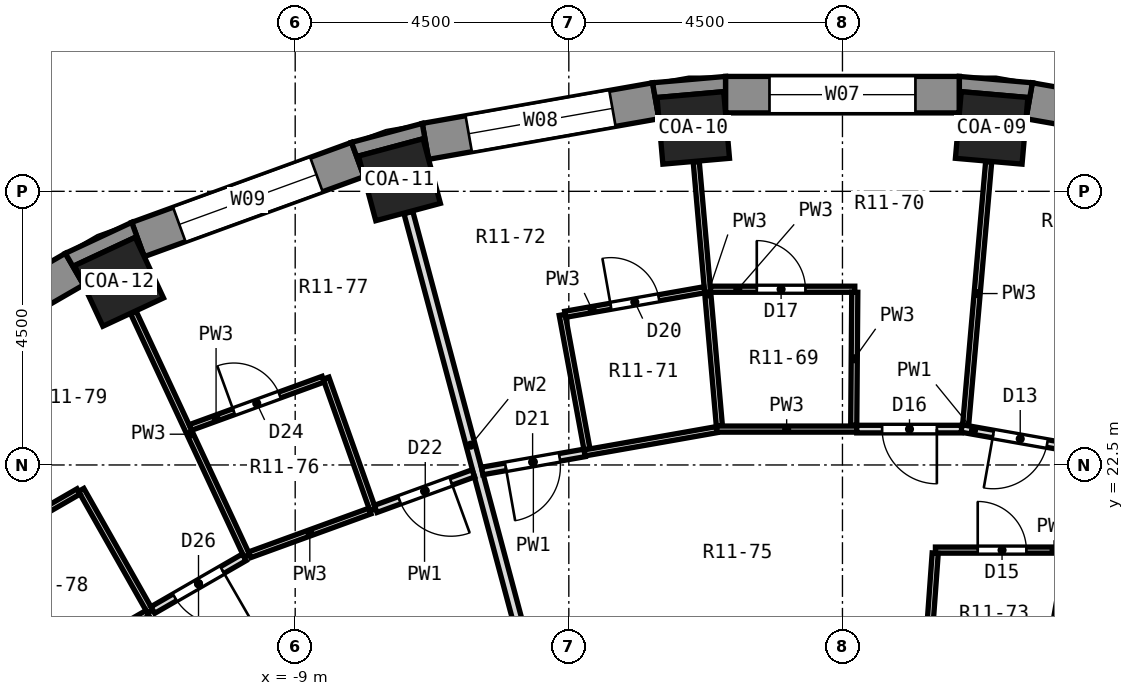
"""IFC4 building model, lengths in metres.
Left out: names, types, materials, properties, quantities, classifications, styles, units other than length and angle.
Written with IfcOpenShell. Run it as: python <this file> out.ifc"""

import sys

from ifc_helpers import new_model, si_unit, direction, frame, frame_2d, origin, origin_2d, place, context, subcontext, project, spatial, polyline, rectangle, outline, extrude, element, fill, save


model = new_model("IFC4")
c1 = context("Model", 3, precision=1e-05, world=origin(), true_north=direction((0.0, 1.0)))
c2 = subcontext(c1, "Body", "Model", "MODEL_VIEW")
j1 = project(units=[si_unit("LENGTHUNIT", "METRE"), si_unit("PLANEANGLEUNIT", "RADIAN")], contexts=[c1])
p1 = place(None, origin())
s1 = spatial("IfcSite", under=j1, at=p1, CompositionType="ELEMENT")
p2 = place(p1, origin())
s2 = spatial("IfcBuilding", under=s1, at=p2, CompositionType="ELEMENT")
p3 = place(p2, frame((0.0, 0.0, 46.1)))
s3 = spatial("IfcBuildingStorey", under=s2, at=p3, CompositionType="ELEMENT", Elevation=46.1)
for number, where, z_axis, x_axis in (
    (1, (2.453, 28.043, 0.0), (0.0, 0.0, 1.0), (0.087, 0.996, 0.0)),
    (2, (-2.453, 28.043, 0.0), (0.0, 0.0, 1.0), (-0.087, 0.996, 0.0)),
    (3, (-7.286, 27.191, 0.0), (0.0, 0.0, 1.0), (-0.259, 0.966, 0.0)),
    (4, (-11.897, 25.512, 0.0), (0.0, 0.0, 1.0), (-0.423, 0.906, 0.0)),
):
    element("IfcColumn", number, at=place(p3, frame(where, z_axis=z_axis, x_axis=x_axis)), inside=s3, PredefinedType="COLUMN", context=c2, shape_type="SweptSolid", body=[
        extrude(rectangle(XDim=1.1, YDim=1.1, at=origin_2d()), origin(), (0.0, 0.0, 1.0), 3.3),
    ])
p4 = place(p3, frame((6.858, 27.821, 0.0), z_axis=(0.0, 0.0, 1.0), x_axis=(-0.984800809218, 0.173687553279, 0.0)))
e5 = element("IfcWall", 5, at=p4, inside=s3, PredefinedType="SOLIDWALL", context=c2, shape_type="SweptSolid", body=[
    extrude(rectangle(XDim=3.846, YDim=0.6, at=frame_2d((1.923, 0.0))), origin(), (0.0, 0.0, 1.0), 2.75),
])
p5 = place(p4, frame((0.723, 0.0, 0.9)))
e6 = element("IfcOpeningElement", 6, at=p5, cuts=e5, PredefinedType="OPENING", context=c2, shape_type="SweptSolid", body=[
    extrude(rectangle(XDim=2.4, YDim=1.8, at=frame_2d((1.2, 0.9))), frame((0.0, 0.312, 0.0), z_axis=(0.0, -1.0, 0.0), x_axis=(1.0, 0.0, 0.0)), (0.0, 0.0, 1.0), 0.624),
])
p6 = place(p3, frame((1.923, 28.59, 0.0), z_axis=(0.0, 0.0, 1.0), x_axis=(-1.0, 0.0, 0.0)))
e7 = element("IfcWall", 7, at=p6, inside=s3, PredefinedType="SOLIDWALL", context=c2, shape_type="SweptSolid", body=[
    extrude(rectangle(XDim=3.846, YDim=0.6, at=frame_2d((1.923, 0.0))), origin(), (0.0, 0.0, 1.0), 2.75),
])
p7 = place(p6, frame((0.723, 0.0, 0.9)))
e8 = element("IfcOpeningElement", 8, at=p7, cuts=e7, PredefinedType="OPENING", context=c2, shape_type="SweptSolid", body=[
    extrude(rectangle(XDim=2.4, YDim=1.8, at=frame_2d((1.2, 0.9))), frame((0.0, 0.312, 0.0), z_axis=(0.0, -1.0, 0.0), x_axis=(1.0, 0.0, 0.0)), (0.0, 0.0, 1.0), 0.624),
])
p8 = place(p3, frame((-3.071, 28.489, 0.0), z_axis=(0.0, 0.0, 1.0), x_axis=(-0.984800809218, -0.173687553279, 0.0)))
e9 = element("IfcWall", 9, at=p8, inside=s3, PredefinedType="SOLIDWALL", context=c2, shape_type="SweptSolid", body=[
    extrude(rectangle(XDim=3.846, YDim=0.6, at=frame_2d((1.923, 0.0))), origin(), (0.0, 0.0, 1.0), 2.75),
])
p9 = place(p8, frame((0.723, 0.0, 0.9)))
e10 = element("IfcOpeningElement", 10, at=p9, cuts=e9, PredefinedType="OPENING", context=c2, shape_type="SweptSolid", body=[
    extrude(rectangle(XDim=2.4, YDim=1.8, at=frame_2d((1.2, 0.9))), frame((0.0, 0.312, 0.0), z_axis=(0.0, -1.0, 0.0), x_axis=(1.0, 0.0, 0.0)), (0.0, 0.0, 1.0), 0.624),
])
p10 = place(p3, frame((-7.971, 27.523, 0.0), z_axis=(0.0, 0.0, 1.0), x_axis=(-0.939689588564, -0.342028474173, 0.0)))
e11 = element("IfcWall", 11, at=p10, inside=s3, PredefinedType="SOLIDWALL", context=c2, shape_type="SweptSolid", body=[
    extrude(rectangle(XDim=3.846, YDim=0.6, at=frame_2d((1.923, 0.0))), origin(), (0.0, 0.0, 1.0), 2.75),
])
p11 = place(p10, frame((0.723, 0.0, 0.9)))
e12 = element("IfcOpeningElement", 12, at=p11, cuts=e11, PredefinedType="OPENING", context=c2, shape_type="SweptSolid", body=[
    extrude(rectangle(XDim=2.4, YDim=1.8, at=frame_2d((1.2, 0.9))), frame((0.0, 0.312, 0.0), z_axis=(0.0, -1.0, 0.0), x_axis=(1.0, 0.0, 0.0)), (0.0, 0.0, 1.0), 0.624),
])
p12 = place(p3, frame((-12.63, 25.721, 0.0), z_axis=(0.0, 0.0, 1.0), x_axis=(-0.86603124159, -0.499989888488, 0.0)))
e13 = element("IfcWall", 13, at=p12, inside=s3, PredefinedType="SOLIDWALL", context=c2, shape_type="SweptSolid", body=[
    extrude(rectangle(XDim=3.846, YDim=0.6, at=frame_2d((1.923, 0.0))), origin(), (0.0, 0.0, 1.0), 2.75),
])
p13 = place(p12, frame((0.723, 0.0, 0.9)))
e14 = element("IfcOpeningElement", 14, at=p13, cuts=e13, PredefinedType="OPENING", context=c2, shape_type="SweptSolid", body=[
    extrude(rectangle(XDim=2.4, YDim=1.8, at=frame_2d((1.2, 0.9))), frame((0.0, 0.312, 0.0), z_axis=(0.0, -1.0, 0.0), x_axis=(1.0, 0.0, 0.0)), (0.0, 0.0, 1.0), 0.624),
])
p14 = place(p3, origin())
e15 = element("IfcWall", 15, at=p14, inside=s3, PredefinedType="SOLIDWALL", context=c2, shape_type="SweptSolid", body=[
    extrude(outline(polyline([(3.123, 28.785), (1.923, 28.89), (1.923, 28.29), (1.954, 28.639), (3.049, 28.543), (3.019, 28.194), (3.123, 28.785)])), origin(), (0.0, 0.0, 1.0), 2.75),
])
p15 = place(p3, origin())
e16 = element("IfcWall", 16, at=p15, inside=s3, PredefinedType="SOLIDWALL", context=c2, shape_type="SweptSolid", body=[
    extrude(outline(polyline([(-1.923, 28.89), (-3.123, 28.785), (-3.019, 28.194), (-3.049, 28.543), (-1.954, 28.639), (-1.923, 28.29), (-1.923, 28.89)])), origin(), (0.0, 0.0, 1.0), 2.75),
])
p16 = place(p3, origin())
e17 = element("IfcWall", 17, at=p16, inside=s3, PredefinedType="SOLIDWALL", context=c2, shape_type="SweptSolid", body=[
    extrude(outline(polyline([(-6.91, 28.117), (-8.074, 27.805), (-7.869, 27.241), (-7.959, 27.58), (-6.897, 27.865), (-6.806, 27.526), (-6.91, 28.117)])), origin(), (0.0, 0.0, 1.0), 2.75),
])
p17 = place(p3, origin())
e18 = element("IfcWall", 18, at=p17, inside=s3, PredefinedType="SOLIDWALL", context=c2, shape_type="SweptSolid", body=[
    extrude(outline(polyline([(-12.78, 25.981), (-12.479, 25.461), (-12.628, 25.779), (-11.631, 26.243), (-11.483, 25.926), (-11.688, 26.49), (-12.78, 25.981)])), origin(), (0.0, 0.0, 1.0), 2.75),
])
p18 = place(p3, frame((-2.405, 27.485, 0.0), z_axis=(0.0, 0.0, 1.0), x_axis=(0.087315535453, -0.996180705128, 0.0)))
e19 = element("IfcWall", 19, at=p18, inside=s3, PredefinedType="PARTITIONING", context=c2, shape_type="SweptSolid", body=[
    extrude(rectangle(XDim=4.362, YDim=0.1, at=frame_2d((2.181, 0.0))), origin(), (0.0, 0.0, 1.0), 2.75),
])
p19 = place(p3, frame((-4.609, 24.969, 0.0), z_axis=(0.0, 0.0, 1.0), x_axis=(0.181195568125, -0.983447083524, 0.0)))
e20 = element("IfcWall", 20, at=p19, inside=s3, PredefinedType="PARTITIONING", context=c2, shape_type="SweptSolid", body=[
    extrude(rectangle(XDim=2.25, YDim=0.1, at=frame_2d((1.125, 0.0))), origin(), (0.0, 0.0, 1.0), 2.75),
])
p20 = place(p3, frame((-7.138, 26.651, 0.0), z_axis=(0.0, 0.0, 1.0), x_axis=(0.258510598433, -0.966008421546, 0.0)))
e21 = element("IfcWall", 21, at=p20, inside=s3, PredefinedType="PARTITIONING", context=c2, shape_type="SweptSolid", body=[
    extrude(rectangle(XDim=7.92, YDim=0.15, at=frame_2d((3.96, 0.0))), origin(), (0.0, 0.0, 1.0), 2.75),
])
p21 = place(p3, frame((-8.493, 23.928, 0.0), z_axis=(0.0, 0.0, 1.0), x_axis=(0.334695622164, -0.942326291952, 0.0)))
e22 = element("IfcWall", 22, at=p21, inside=s3, PredefinedType="PARTITIONING", context=c2, shape_type="SweptSolid", body=[
    extrude(rectangle(XDim=2.301, YDim=0.1, at=frame_2d((1.15, 0.0))), origin(), (0.0, 0.0, 1.0), 2.75),
])
p22 = place(p3, frame((-11.66, 25.005, 0.0), z_axis=(0.0, 0.0, 1.0), x_axis=(0.422658280027, -0.906289125127, 0.0)))
e23 = element("IfcWall", 23, at=p22, inside=s3, PredefinedType="PARTITIONING", context=c2, shape_type="SweptSolid", body=[
    extrude(rectangle(XDim=4.413, YDim=0.1, at=frame_2d((2.206, 0.0))), origin(), (0.0, 0.0, 1.0), 2.75),
])
p23 = place(p3, frame((-12.519, 22.09, 0.0), z_axis=(0.0, 0.0, 1.0), x_axis=(0.49306078006, -0.869994866173, 0.0)))
e24 = element("IfcWall", 24, at=p23, inside=s3, PredefinedType="PARTITIONING", context=c2, shape_type="SweptSolid", body=[
    extrude(rectangle(XDim=2.3, YDim=0.1, at=frame_2d((1.15, 0.0))), origin(), (0.0, 0.0, 1.0), 2.75),
])
p24 = place(p3, frame((1.958, 23.101, 0.0), z_axis=(0.0, 0.0, 1.0), x_axis=(0.984778239754, -0.173815472575, 0.0)))
e25 = element("IfcWall", 25, at=p24, inside=s3, PredefinedType="PARTITIONING", context=c2, shape_type="SweptSolid", body=[
    extrude(rectangle(XDim=1.848, YDim=0.125, at=frame_2d((0.924, 0.0))), origin(), (0.0, 0.0, 1.0), 2.75),
])
p25 = place(p24, frame((0.531, 0.0, 0.0)))
e26 = element("IfcOpeningElement", 26, at=p25, cuts=e25, PredefinedType="OPENING", context=c2, shape_type="SweptSolid", body=[
    extrude(rectangle(XDim=0.9, YDim=2.1, at=frame_2d((0.45, 1.05))), frame((0.0, 0.074, 0.0), z_axis=(0.0, -1.0, 0.0), x_axis=(1.0, 0.0, 0.0)), (0.0, 0.0, 1.0), 0.149),
])
p26 = place(p3, frame((1.529, 21.1, 0.0), z_axis=(0.0, 0.0, 1.0), x_axis=(1.0, 0.0, 0.0)))
e27 = element("IfcWall", 27, at=p26, inside=s3, PredefinedType="PARTITIONING", context=c2, shape_type="SweptSolid", body=[
    extrude(rectangle(XDim=2.191, YDim=0.1, at=frame_2d((1.095, 0.0))), origin(), (0.0, 0.0, 1.0), 2.75),
])
p27 = place(p26, frame((0.696, 0.0, 0.0)))
e28 = element("IfcOpeningElement", 28, at=p27, cuts=e27, PredefinedType="OPENING", context=c2, shape_type="SweptSolid", body=[
    extrude(rectangle(XDim=0.8, YDim=2.1, at=frame_2d((0.4, 1.05))), frame((0.0, 0.062, 0.0), z_axis=(0.0, -1.0, 0.0), x_axis=(1.0, 0.0, 0.0)), (0.0, 0.0, 1.0), 0.124),
])
p28 = place(p3, frame((-2.071, 23.09, 0.0), z_axis=(0.0, 0.0, 1.0), x_axis=(1.0, 0.0, 0.0)))
e29 = element("IfcWall", 29, at=p28, inside=s3, PredefinedType="PARTITIONING", context=c2, shape_type="SweptSolid", body=[
    extrude(rectangle(XDim=2.306, YDim=0.1, at=frame_2d((1.153, 0.0))), origin(), (0.0, 0.0, 1.0), 2.75),
])
p29 = place(p3, frame((0.235, 23.09, 0.0), z_axis=(0.0, 0.0, 1.0), x_axis=(1.0, 0.0, 0.0)))
e30 = element("IfcWall", 30, at=p29, inside=s3, PredefinedType="PARTITIONING", context=c2, shape_type="SweptSolid", body=[
    extrude(rectangle(XDim=1.722, YDim=0.125, at=frame_2d((0.861, 0.0))), origin(), (0.0, 0.0, 1.0), 2.75),
])
p30 = place(p29, frame((0.417, 0.0, 0.0)))
e31 = element("IfcOpeningElement", 31, at=p30, cuts=e30, PredefinedType="OPENING", context=c2, shape_type="SweptSolid", body=[
    extrude(rectangle(XDim=0.9, YDim=2.1, at=frame_2d((0.45, 1.05))), frame((0.0, 0.074, 0.0), z_axis=(0.0, -1.0, 0.0), x_axis=(1.0, 0.0, 0.0)), (0.0, 0.0, 1.0), 0.149),
])
p31 = place(p3, frame((-2.171, 25.39, 0.0), z_axis=(0.0, 0.0, 1.0), x_axis=(1.0, 0.0, 0.0)))
e32 = element("IfcWall", 32, at=p31, inside=s3, PredefinedType="PARTITIONING", context=c2, shape_type="SweptSolid", body=[
    extrude(rectangle(XDim=2.374, YDim=0.1, at=frame_2d((1.187, 0.0))), origin(), (0.0, 0.0, 1.0), 2.75),
])
p32 = place(p31, frame((0.762, 0.0, 0.0)))
e33 = element("IfcOpeningElement", 33, at=p32, cuts=e32, PredefinedType="OPENING", context=c2, shape_type="SweptSolid", body=[
    extrude(rectangle(XDim=0.8, YDim=2.1, at=frame_2d((0.4, 1.05))), frame((0.0, 0.062, 0.0), z_axis=(0.0, -1.0, 0.0), x_axis=(1.0, 0.0, 0.0)), (0.0, 0.0, 1.0), 0.124),
])
p33 = place(p3, frame((-4.241, 22.698, 0.0), z_axis=(0.0, 0.0, 1.0), x_axis=(0.984822536066, 0.173564317922, 0.0)))
e34 = element("IfcWall", 34, at=p33, inside=s3, PredefinedType="PARTITIONING", context=c2, shape_type="SweptSolid", body=[
    extrude(rectangle(XDim=2.206, YDim=0.1, at=frame_2d((1.103, 0.0))), origin(), (0.0, 0.0, 1.0), 2.75),
])
p34 = place(p3, frame((-5.925, 22.401, 0.0), z_axis=(0.0, 0.0, 1.0), x_axis=(0.984786433544, 0.173769043008, 0.0)))
e35 = element("IfcWall", 35, at=p34, inside=s3, PredefinedType="PARTITIONING", context=c2, shape_type="SweptSolid", body=[
    extrude(rectangle(XDim=1.71, YDim=0.125, at=frame_2d((0.855, 0.0))), origin(), (0.0, 0.0, 1.0), 2.75),
])
p35 = place(p34, frame((0.393, 0.0, 0.0)))
e36 = element("IfcOpeningElement", 36, at=p35, cuts=e35, PredefinedType="OPENING", context=c2, shape_type="SweptSolid", body=[
    extrude(rectangle(XDim=0.9, YDim=2.1, at=frame_2d((0.45, 1.05))), frame((0.0, 0.074, 0.0), z_axis=(0.0, -1.0, 0.0), x_axis=(1.0, 0.0, 0.0)), (0.0, 0.0, 1.0), 0.149),
])
p36 = place(p3, frame((-4.56, 24.978, 0.0), z_axis=(0.0, 0.0, 1.0), x_axis=(0.984818426074, 0.173587636842, 0.0)))
e37 = element("IfcWall", 37, at=p36, inside=s3, PredefinedType="PARTITIONING", context=c2, shape_type="SweptSolid", body=[
    extrude(rectangle(XDim=2.325, YDim=0.1, at=frame_2d((1.163, 0.0))), origin(), (0.0, 0.0, 1.0), 2.75),
])
p37 = place(p36, frame((0.762, 0.0, 0.0)))
e38 = element("IfcOpeningElement", 38, at=p37, cuts=e37, PredefinedType="OPENING", context=c2, shape_type="SweptSolid", body=[
    extrude(rectangle(XDim=0.8, YDim=2.1, at=frame_2d((0.4, 1.05))), frame((0.0, 0.062, 0.0), z_axis=(0.0, -1.0, 0.0), x_axis=(1.0, 0.0, 0.0)), (0.0, 0.0, 1.0), 0.124),
])
p38 = place(p3, frame((-9.748, 21.023, 0.0), z_axis=(0.0, 0.0, 1.0), x_axis=(0.939725675468, 0.341929312674, 0.0)))
e39 = element("IfcWall", 39, at=p38, inside=s3, PredefinedType="PARTITIONING", context=c2, shape_type="SweptSolid", body=[
    extrude(rectangle(XDim=2.105, YDim=0.1, at=frame_2d((1.052, 0.0))), origin(), (0.0, 0.0, 1.0), 2.75),
])
p39 = place(p3, frame((-7.676, 21.777, 0.0), z_axis=(0.0, 0.0, 1.0), x_axis=(0.939597315436, 0.342281879195, 0.0)))
e40 = element("IfcWall", 40, at=p39, inside=s3, PredefinedType="PARTITIONING", context=c2, shape_type="SweptSolid", body=[
    extrude(rectangle(XDim=1.71, YDim=0.125, at=frame_2d((0.855, 0.0))), origin(), (0.0, 0.0, 1.0), 2.75),
])
p40 = place(p39, frame((0.417, 0.0, 0.0)))
e41 = element("IfcOpeningElement", 41, at=p40, cuts=e40, PredefinedType="OPENING", context=c2, shape_type="SweptSolid", body=[
    extrude(rectangle(XDim=0.9, YDim=2.1, at=frame_2d((0.45, 1.05))), frame((0.0, 0.074, 0.0), z_axis=(0.0, -1.0, 0.0), x_axis=(1.0, 0.0, 0.0)), (0.0, 0.0, 1.0), 0.149),
])
p41 = place(p3, frame((-10.724, 23.116, 0.0), z_axis=(0.0, 0.0, 1.0), x_axis=(0.939716717369, 0.34195393125, 0.0)))
e42 = element("IfcWall", 42, at=p41, inside=s3, PredefinedType="PARTITIONING", context=c2, shape_type="SweptSolid", body=[
    extrude(rectangle(XDim=2.324, YDim=0.1, at=frame_2d((1.162, 0.0))), origin(), (0.0, 0.0, 1.0), 2.75),
])
p42 = place(p41, frame((0.762, 0.0, 0.0)))
e43 = element("IfcOpeningElement", 43, at=p42, cuts=e42, PredefinedType="OPENING", context=c2, shape_type="SweptSolid", body=[
    extrude(rectangle(XDim=0.8, YDim=2.1, at=frame_2d((0.4, 1.05))), frame((0.0, 0.062, 0.0), z_axis=(0.0, -1.0, 0.0), x_axis=(1.0, 0.0, 0.0)), (0.0, 0.0, 1.0), 0.124),
])
p43 = place(p3, frame((-13.338, 18.961, 0.0), z_axis=(0.0, 0.0, 1.0), x_axis=(0.865883187712, 0.500246244601, 0.0)))
e44 = element("IfcWall", 44, at=p43, inside=s3, PredefinedType="PARTITIONING", context=c2, shape_type="SweptSolid", body=[
    extrude(rectangle(XDim=2.206, YDim=0.1, at=frame_2d((1.103, 0.0))), origin(), (0.0, 0.0, 1.0), 2.75),
])
p44 = place(p3, frame((-11.342, 20.114, 0.0), z_axis=(0.0, 0.0, 1.0), x_axis=(0.866288616225, 0.499543825303, 0.0)))
e45 = element("IfcWall", 45, at=p44, inside=s3, PredefinedType="PARTITIONING", context=c2, shape_type="SweptSolid", body=[
    extrude(rectangle(XDim=1.735, YDim=0.125, at=frame_2d((0.868, 0.0))), origin(), (0.0, 0.0, 1.0), 2.75),
])
p45 = place(p44, frame((0.418, 0.0, 0.0)))
e46 = element("IfcOpeningElement", 46, at=p45, cuts=e45, PredefinedType="OPENING", context=c2, shape_type="SweptSolid", body=[
    extrude(rectangle(XDim=0.9, YDim=2.1, at=frame_2d((0.45, 1.05))), frame((0.0, 0.074, 0.0), z_axis=(0.0, -1.0, 0.0), x_axis=(1.0, 0.0, 0.0)), (0.0, 0.0, 1.0), 0.149),
])
p46 = place(p3, frame((-14.575, 20.902, 0.0), z_axis=(0.0, 0.0, 1.0), x_axis=(0.865919666768, 0.50018309718, 0.0)))
e47 = element("IfcWall", 47, at=p46, inside=s3, PredefinedType="PARTITIONING", context=c2, shape_type="SweptSolid", body=[
    extrude(rectangle(XDim=2.324, YDim=0.1, at=frame_2d((1.162, 0.0))), origin(), (0.0, 0.0, 1.0), 2.75),
])
p47 = place(p46, frame((0.762, 0.0, 0.0)))
e48 = element("IfcOpeningElement", 48, at=p47, cuts=e47, PredefinedType="OPENING", context=c2, shape_type="SweptSolid", body=[
    extrude(rectangle(XDim=0.8, YDim=2.1, at=frame_2d((0.4, 1.05))), frame((0.0, 0.062, 0.0), z_axis=(0.0, -1.0, 0.0), x_axis=(1.0, 0.0, 0.0)), (0.0, 0.0, 1.0), 0.124),
])
p48 = place(p3, frame((3.361, 19.062, 0.0), z_axis=(0.0, 0.0, 1.0), x_axis=(0.173564686846, 0.984822471047, 0.0)))
e49 = element("IfcWall", 49, at=p48, inside=s3, PredefinedType="PARTITIONING", context=c2, shape_type="SweptSolid", body=[
    extrude(rectangle(XDim=2.02, YDim=0.1, at=frame_2d((1.01, 0.0))), origin(), (0.0, 0.0, 1.0), 2.75),
])
p49 = place(p3, frame((2.025, 23.152, 0.0), z_axis=(0.0, 0.0, 1.0), x_axis=(0.087174609927, 0.996193047247, 0.0)))
e50 = element("IfcWall", 50, at=p49, inside=s3, PredefinedType="PARTITIONING", context=c2, shape_type="SweptSolid", body=[
    extrude(rectangle(XDim=4.349, YDim=0.1, at=frame_2d((2.175, 0.0))), origin(), (0.0, 0.0, 1.0), 2.75),
])
p50 = place(p3, frame((1.382, 19.062, 0.0), z_axis=(0.0, 0.0, 1.0), x_axis=(0.072152400095, 0.997393618969, 0.0)))
e51 = element("IfcWall", 51, at=p50, inside=s3, PredefinedType="PARTITIONING", context=c2, shape_type="SweptSolid", body=[
    extrude(rectangle(XDim=1.993, YDim=0.1, at=frame_2d((0.997, 0.0))), origin(), (0.0, 0.0, 1.0), 2.75),
])
p51 = place(p3, frame((0.186, 23.153, 0.0), z_axis=(0.0, 0.0, 1.0), x_axis=(0.007812261592, 0.999969483819, 0.0)))
e52 = element("IfcWall", 52, at=p51, inside=s3, PredefinedType="PARTITIONING", context=c2, shape_type="SweptSolid", body=[
    extrude(rectangle(XDim=2.188, YDim=0.1, at=frame_2d((1.094, 0.0))), origin(), (0.0, 0.0, 1.0), 2.75),
])
p52 = place(p7, origin())
e53 = element("IfcWindow", 53, at=p52, inside=s3, PartitioningType="SINGLE_PANEL", PredefinedType="WINDOW", context=c2, shape_type="SweptSolid", body=[
    extrude(rectangle(XDim=2.4, YDim=1.8, at=frame_2d((1.2, 0.9))), frame((0.0, 0.18, 0.0), z_axis=(0.0, -1.0, 0.0), x_axis=(1.0, 0.0, 0.0)), (0.0, 0.0, 1.0), 0.06),
])
fill(e8, e53)
p53 = place(p9, origin())
e54 = element("IfcWindow", 54, at=p53, inside=s3, PartitioningType="SINGLE_PANEL", PredefinedType="WINDOW", context=c2, shape_type="SweptSolid", body=[
    extrude(rectangle(XDim=2.4, YDim=1.8, at=frame_2d((1.2, 0.9))), frame((0.0, 0.18, 0.0), z_axis=(0.0, -1.0, 0.0), x_axis=(1.0, 0.0, 0.0)), (0.0, 0.0, 1.0), 0.06),
])
fill(e10, e54)
p54 = place(p11, origin())
e55 = element("IfcWindow", 55, at=p54, inside=s3, PartitioningType="SINGLE_PANEL", PredefinedType="WINDOW", context=c2, shape_type="SweptSolid", body=[
    extrude(rectangle(XDim=2.4, YDim=1.8, at=frame_2d((1.2, 0.9))), frame((0.0, 0.18, 0.0), z_axis=(0.0, -1.0, 0.0), x_axis=(1.0, 0.0, 0.0)), (0.0, 0.0, 1.0), 0.06),
])
fill(e12, e55)
p55 = place(p25, frame((0.9, 0.0, 0.0), z_axis=(0.0, 0.0, 1.0), x_axis=(-1.0, 0.0, 0.0)))
e56 = element("IfcDoor", 56, at=p55, inside=s3, OperationType="SINGLE_SWING_RIGHT", PredefinedType="DOOR", context=c2, shape_type="SweptSolid", body=[
    extrude(rectangle(XDim=0.9, YDim=2.1, at=frame_2d((0.45, 1.05))), frame((0.0, 0.025, 0.0), z_axis=(0.0, -1.0, 0.0), x_axis=(1.0, 0.0, 0.0)), (0.0, 0.0, 1.0), 0.05),
])
fill(e26, e56)
p56 = place(p27, origin())
e57 = element("IfcDoor", 57, at=p56, inside=s3, OperationType="SINGLE_SWING_LEFT", PredefinedType="DOOR", context=c2, shape_type="SweptSolid", body=[
    extrude(rectangle(XDim=0.8, YDim=2.1, at=frame_2d((0.4, 1.05))), frame((0.0, 0.025, 0.0), z_axis=(0.0, -1.0, 0.0), x_axis=(1.0, 0.0, 0.0)), (0.0, 0.0, 1.0), 0.05),
])
fill(e28, e57)
p57 = place(p30, frame((0.9, 0.0, 0.0), z_axis=(0.0, 0.0, 1.0), x_axis=(-1.0, 0.0, 0.0)))
e58 = element("IfcDoor", 58, at=p57, inside=s3, OperationType="SINGLE_SWING_LEFT", PredefinedType="DOOR", context=c2, shape_type="SweptSolid", body=[
    extrude(rectangle(XDim=0.9, YDim=2.1, at=frame_2d((0.45, 1.05))), frame((0.0, 0.025, 0.0), z_axis=(0.0, -1.0, 0.0), x_axis=(1.0, 0.0, 0.0)), (0.0, 0.0, 1.0), 0.05),
])
fill(e31, e58)
p58 = place(p32, origin())
e59 = element("IfcDoor", 59, at=p58, inside=s3, OperationType="SINGLE_SWING_LEFT", PredefinedType="DOOR", context=c2, shape_type="SweptSolid", body=[
    extrude(rectangle(XDim=0.8, YDim=2.1, at=frame_2d((0.4, 1.05))), frame((0.0, 0.025, 0.0), z_axis=(0.0, -1.0, 0.0), x_axis=(1.0, 0.0, 0.0)), (0.0, 0.0, 1.0), 0.05),
])
fill(e33, e59)
p59 = place(p37, origin())
e60 = element("IfcDoor", 60, at=p59, inside=s3, OperationType="SINGLE_SWING_LEFT", PredefinedType="DOOR", context=c2, shape_type="SweptSolid", body=[
    extrude(rectangle(XDim=0.8, YDim=2.1, at=frame_2d((0.4, 1.05))), frame((0.0, 0.025, 0.0), z_axis=(0.0, -1.0, 0.0), x_axis=(1.0, 0.0, 0.0)), (0.0, 0.0, 1.0), 0.05),
])
fill(e38, e60)
p60 = place(p35, frame((0.9, 0.0, 0.0), z_axis=(0.0, 0.0, 1.0), x_axis=(-1.0, 0.0, 0.0)))
e61 = element("IfcDoor", 61, at=p60, inside=s3, OperationType="SINGLE_SWING_RIGHT", PredefinedType="DOOR", context=c2, shape_type="SweptSolid", body=[
    extrude(rectangle(XDim=0.9, YDim=2.1, at=frame_2d((0.45, 1.05))), frame((0.0, 0.025, 0.0), z_axis=(0.0, -1.0, 0.0), x_axis=(1.0, 0.0, 0.0)), (0.0, 0.0, 1.0), 0.05),
])
fill(e36, e61)
p61 = place(p40, frame((0.9, 0.0, 0.0), z_axis=(0.0, 0.0, 1.0), x_axis=(-1.0, 0.0, 0.0)))
e62 = element("IfcDoor", 62, at=p61, inside=s3, OperationType="SINGLE_SWING_LEFT", PredefinedType="DOOR", context=c2, shape_type="SweptSolid", body=[
    extrude(rectangle(XDim=0.9, YDim=2.1, at=frame_2d((0.45, 1.05))), frame((0.0, 0.025, 0.0), z_axis=(0.0, -1.0, 0.0), x_axis=(1.0, 0.0, 0.0)), (0.0, 0.0, 1.0), 0.05),
])
fill(e41, e62)
p62 = place(p42, origin())
e63 = element("IfcDoor", 63, at=p62, inside=s3, OperationType="SINGLE_SWING_LEFT", PredefinedType="DOOR", context=c2, shape_type="SweptSolid", body=[
    extrude(rectangle(XDim=0.8, YDim=2.1, at=frame_2d((0.4, 1.05))), frame((0.0, 0.025, 0.0), z_axis=(0.0, -1.0, 0.0), x_axis=(1.0, 0.0, 0.0)), (0.0, 0.0, 1.0), 0.05),
])
fill(e43, e63)
p63 = place(p45, frame((0.9, 0.0, 0.0), z_axis=(0.0, 0.0, 1.0), x_axis=(-1.0, 0.0, 0.0)))
e64 = element("IfcDoor", 64, at=p63, inside=s3, OperationType="SINGLE_SWING_LEFT", PredefinedType="DOOR", context=c2, shape_type="SweptSolid", body=[
    extrude(rectangle(XDim=0.9, YDim=2.1, at=frame_2d((0.45, 1.05))), frame((0.0, 0.025, 0.0), z_axis=(0.0, -1.0, 0.0), x_axis=(1.0, 0.0, 0.0)), (0.0, 0.0, 1.0), 0.05),
])
fill(e46, e64)
save(model, sys.argv[1])
